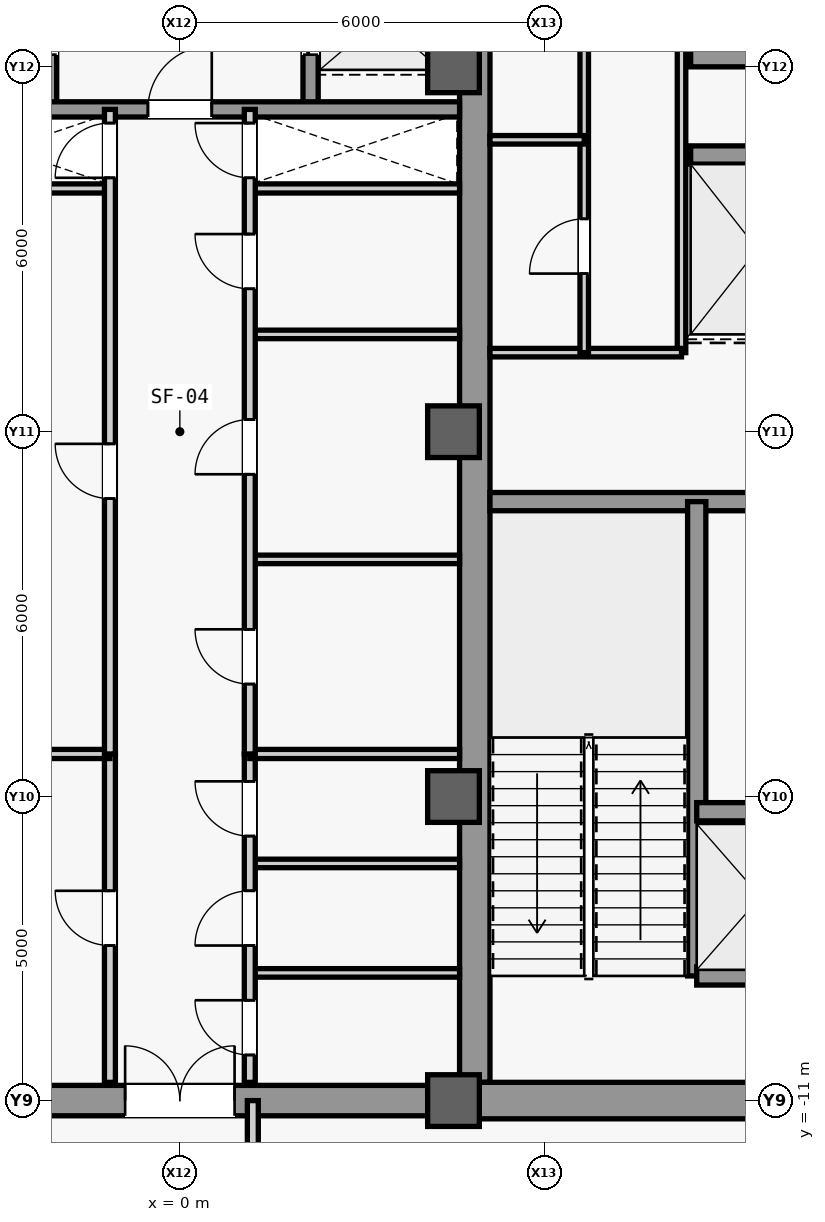
"""IFC4 building model, lengths in metres.
Left out: names, types, materials, properties, quantities, classifications, styles, units other than length and angle.
Written with IfcOpenShell. Run it as: python <this file> out.ifc"""

import sys

from ifc_helpers import new_model, si_unit, direction, frame, frame_2d, origin, origin_2d, place, context, subcontext, project, spatial, rectangle, extrude, source, transform, mapped, element, fill, save


model = new_model("IFC4")
c1 = context("Model", 3, precision=1e-05, world=origin(), true_north=direction((0.0, 1.0)))
c2 = subcontext(c1, "Body", "Model", "MODEL_VIEW")
j1 = project(units=[si_unit("LENGTHUNIT", "METRE"), si_unit("PLANEANGLEUNIT", "RADIAN")], contexts=[c1])
p1 = place(None, origin())
s1 = spatial("IfcSite", under=j1, at=p1, CompositionType="ELEMENT")
p2 = place(p1, origin())
s2 = spatial("IfcBuilding", under=s1, at=p2, CompositionType="ELEMENT")
p3 = place(p2, frame((0.0, 0.0, 263.1)))
s3 = spatial("IfcBuildingStorey", under=s2, at=p3, CompositionType="ELEMENT", Elevation=263.1)
m1 = source(origin(), c2, "Body", "SweptSolid", [
    extrude(rectangle(XDim=21.4, YDim=0.5, at=frame_2d((10.7, 0.0))), origin(), (0.0, 0.0, 1.0), 4.6),
])
p4 = place(p3, frame((4.85, -10.7, 0.0), z_axis=(0.0, 0.0, 1.0), x_axis=(0.0, 1.0, 0.0)))
e1 = element("IfcWall", 1, at=p4, inside=s3, PredefinedType="SHEAR", context=c2, shape_type="MappedRepresentation", body=[
    mapped(m1, transform((0.0, 0.0, 0.0), scale=1.0)),
])
m2 = source(origin(), c2, "Body", "SweptSolid", [
    extrude(rectangle(XDim=5.9, YDim=0.6, at=frame_2d((2.95, 0.0))), origin(), (0.0, 0.0, 1.0), 4.6),
])
p5 = place(p3, frame((4.85, -11.0, 0.0), z_axis=(0.0, 0.0, 1.0), x_axis=(1.0, 0.0, 0.0)))
e2 = element("IfcWall", 2, at=p5, inside=s3, PredefinedType="SHEAR", context=c2, shape_type="MappedRepresentation", body=[
    mapped(m2, transform((0.0, 0.0, 0.0), scale=1.0)),
])
m3 = source(origin(), c2, "Body", "SweptSolid", [
    extrude(rectangle(XDim=5.65, YDim=0.3, at=frame_2d((2.825, 0.0))), origin(), (0.0, 0.0, 1.0), 4.6),
])
p6 = place(p3, frame((5.1, -1.15, 0.0), z_axis=(0.0, 0.0, 1.0), x_axis=(1.0, 0.0, 0.0)))
e3 = element("IfcWall", 3, at=p6, inside=s3, PredefinedType="SHEAR", context=c2, shape_type="MappedRepresentation", body=[
    mapped(m3, transform((0.0, 0.0, 0.0), scale=1.0)),
])
m4 = source(origin(), c2, "Body", "SweptSolid", [
    extrude(rectangle(XDim=9.2, YDim=0.5, at=frame_2d((4.6, 0.0))), origin(), (0.0, 0.0, 1.0), 4.6),
])
p7 = place(p3, frame((-4.6, -11.0, 0.0), z_axis=(0.0, 0.0, 1.0), x_axis=(1.0, 0.0, 0.0)))
e4 = element("IfcWall", 4, at=p7, inside=s3, PredefinedType="SHEAR", context=c2, shape_type="MappedRepresentation", body=[
    mapped(m4, transform((0.0, 0.0, 0.0), scale=1.0)),
])
m5 = source(origin(), c2, "Body", "SweptSolid", [
    extrude(rectangle(XDim=1.8, YDim=2.25, at=frame_2d((0.9, 1.125))), frame((0.0, 0.26, 0.0), z_axis=(0.0, -1.0, 0.0), x_axis=(1.0, 0.0, 0.0)), (0.0, 0.0, 1.0), 0.52),
])
p8 = place(p7, frame((3.7, 0.0, 0.0)))
e5 = element("IfcOpeningElement", 5, at=p8, cuts=e4, PredefinedType="OPENING", context=c2, shape_type="MappedRepresentation", body=[
    mapped(m5, transform((0.0, 0.0, 0.0), scale=1.0)),
])
m6 = source(origin(), c2, "Body", "SweptSolid", [
    extrude(rectangle(XDim=0.85, YDim=0.85, at=origin_2d()), origin(), (0.0, 0.0, 1.0), 5.2),
])
for number, where, z_axis, x_axis in (
    (6, (4.5, -11.0, 0.0), (0.0, 0.0, 1.0), (1.0, 0.0, 0.0)),
    (7, (4.5, -6.0, 0.0), (0.0, 0.0, 1.0), (1.0, 0.0, 0.0)),
    (8, (4.5, 0.0, 0.0), (0.0, 0.0, 1.0), (1.0, 0.0, 0.0)),
    (9, (4.5, 6.0, 0.0), (0.0, 0.0, 1.0), (1.0, 0.0, 0.0)),
):
    element("IfcColumn", number, at=place(p3, frame(where, z_axis=z_axis, x_axis=x_axis)), inside=s3, PredefinedType="COLUMN", context=c2, shape_type="MappedRepresentation", body=[
        mapped(m6, transform((0.0, 0.0, 0.0), scale=1.0)),
    ])
m7 = source(origin(), c2, "Body", "SweptSolid", [
    extrude(rectangle(XDim=7.8, YDim=0.3, at=frame_2d((3.9, 0.0))), origin(), (0.0, 0.0, 1.0), 4.6),
])
p9 = place(p3, frame((8.5, -8.95, 0.0), z_axis=(0.0, 0.0, 1.0), x_axis=(0.0, 1.0, 0.0)))
e10 = element("IfcWall", 10, at=p9, inside=s3, PredefinedType="SHEAR", context=c2, shape_type="MappedRepresentation", body=[
    mapped(m7, transform((0.0, 0.0, 0.0), scale=1.0)),
])
m8 = source(origin(), c2, "Body", "SweptSolid", [
    extrude(rectangle(XDim=2.2, YDim=0.3, at=frame_2d((1.1, 0.0))), origin(), (0.0, 0.0, 1.0), 4.6),
])
for number, where, z_axis, x_axis in (
    (11, (8.5, -8.95, 0.0), (0.0, 0.0, 1.0), (1.0, 0.0, 0.0)),
    (12, (8.5, -6.25, 0.0), (0.0, 0.0, 1.0), (1.0, 0.0, 0.0)),
):
    element("IfcWall", number, at=place(p3, frame(where, z_axis=z_axis, x_axis=x_axis)), inside=s3, PredefinedType="SHEAR", context=c2, shape_type="MappedRepresentation", body=[
        mapped(m8, transform((0.0, 0.0, 0.0), scale=1.0)),
    ])
m9 = source(origin(), c2, "Body", "SweptSolid", [
    extrude(rectangle(XDim=2.3, YDim=0.3, at=frame_2d((1.15, 0.0))), origin(), (0.0, 0.0, 1.0), 4.6),
])
for number, where, z_axis, x_axis in (
    (13, (8.4, 4.55, 0.0), (0.0, 0.0, 1.0), (1.0, 0.0, 0.0)),
    (14, (8.4, 6.15, 0.0), (0.0, 0.0, 1.0), (1.0, 0.0, 0.0)),
):
    element("IfcWall", number, at=place(p3, frame(where, z_axis=z_axis, x_axis=x_axis)), inside=s3, PredefinedType="SHEAR", context=c2, shape_type="MappedRepresentation", body=[
        mapped(m9, transform((0.0, 0.0, 0.0), scale=1.0)),
    ])
m10 = source(origin(), c2, "Body", "SweptSolid", [
    extrude(rectangle(XDim=9.4, YDim=0.14, at=frame_2d((4.7, 0.0))), origin(), (0.0, 0.0, 1.0), 4.6),
])
p10 = place(p3, frame((8.25, 1.3, 0.0), z_axis=(0.0, 0.0, 1.0), x_axis=(0.0, 1.0, 0.0)))
e15 = element("IfcWall", 15, at=p10, inside=s3, PredefinedType="PARTITIONING", context=c2, shape_type="MappedRepresentation", body=[
    mapped(m10, transform((0.0, 0.0, 0.0), scale=1.0)),
])
m11 = source(origin(), c2, "Body", "SweptSolid", [
    extrude(rectangle(XDim=3.15, YDim=0.14, at=frame_2d((1.575, 0.0))), origin(), (0.0, 0.0, 1.0), 4.6),
])
p11 = place(p3, frame((5.1, 1.3, 0.0), z_axis=(0.0, 0.0, 1.0), x_axis=(1.0, 0.0, 0.0)))
e16 = element("IfcWall", 16, at=p11, inside=s3, PredefinedType="PARTITIONING", context=c2, shape_type="MappedRepresentation", body=[
    mapped(m11, transform((0.0, 0.0, 0.0), scale=1.0)),
])
m12 = source(origin(), c2, "Body", "SweptSolid", [
    extrude(rectangle(XDim=7.1, YDim=0.14, at=frame_2d((3.55, 0.0))), origin(), (0.0, 0.0, 1.0), 4.6),
])
p12 = place(p3, frame((6.65, 1.3, 0.0), z_axis=(0.0, 0.0, 1.0), x_axis=(0.0, 1.0, 0.0)))
e17 = element("IfcWall", 17, at=p12, inside=s3, PredefinedType="PARTITIONING", context=c2, shape_type="MappedRepresentation", body=[
    mapped(m12, transform((0.0, 0.0, 0.0), scale=1.0)),
])
m13 = source(origin(), c2, "Body", "SweptSolid", [
    extrude(rectangle(XDim=0.9, YDim=2.15, at=frame_2d((0.45, 1.075))), frame((0.0, 0.08, 0.0), z_axis=(0.0, -1.0, 0.0), x_axis=(1.0, 0.0, 0.0)), (0.0, 0.0, 1.0), 0.16),
])
p13 = place(p12, frame((1.3, 0.0, 0.0)))
e18 = element("IfcOpeningElement", 18, at=p13, cuts=e17, PredefinedType="OPENING", context=c2, shape_type="MappedRepresentation", body=[
    mapped(m13, transform((0.0, 0.0, 0.0), scale=1.0)),
])
m14 = source(origin(), c2, "Body", "SweptSolid", [
    extrude(rectangle(XDim=1.55, YDim=0.14, at=frame_2d((0.775, 0.0))), origin(), (0.0, 0.0, 1.0), 4.6),
])
p14 = place(p3, frame((5.1, 4.8, 0.0), z_axis=(0.0, 0.0, 1.0), x_axis=(1.0, 0.0, 0.0)))
e19 = element("IfcWall", 19, at=p14, inside=s3, PredefinedType="PARTITIONING", context=c2, shape_type="MappedRepresentation", body=[
    mapped(m14, transform((0.0, 0.0, 0.0), scale=1.0)),
])
m15 = source(origin(), c2, "Body", "SweptSolid", [
    extrude(rectangle(XDim=3.45, YDim=0.15, at=frame_2d((1.725, 0.0))), origin(), (0.0, 0.0, 1.0), 4.6),
])
for number, where, z_axis, x_axis in (
    (20, (-4.6, 4.0, 0.0), (0.0, 0.0, 1.0), (1.0, 0.0, 0.0)),
    (21, (1.15, 4.0, 0.0), (0.0, 0.0, 1.0), (1.0, 0.0, 0.0)),
):
    element("IfcWall", number, at=place(p3, frame(where, z_axis=z_axis, x_axis=x_axis)), inside=s3, PredefinedType="PARTITIONING", context=c2, shape_type="MappedRepresentation", body=[
        mapped(m15, transform((0.0, 0.0, 0.0), scale=1.0)),
    ])
m16 = source(origin(), c2, "Body", "SweptSolid", [
    extrude(rectangle(XDim=5.4, YDim=0.18, at=frame_2d((2.7, 0.0))), origin(), (0.0, 0.0, 1.0), 4.6),
])
p15 = place(p3, frame((-1.15, -10.7, 0.0), z_axis=(0.0, 0.0, 1.0), x_axis=(0.0, 1.0, 0.0)))
e22 = element("IfcWall", 22, at=p15, inside=s3, PredefinedType="PARTITIONING", context=c2, shape_type="MappedRepresentation", body=[
    mapped(m16, transform((0.0, 0.0, 0.0), scale=1.0)),
])
m17 = source(origin(), c2, "Body", "SweptSolid", [
    extrude(rectangle(XDim=0.9, YDim=2.15, at=frame_2d((0.45, 1.075))), frame((0.0, 0.1, 0.0), z_axis=(0.0, -1.0, 0.0), x_axis=(1.0, 0.0, 0.0)), (0.0, 0.0, 1.0), 0.2),
])
p16 = place(p15, frame((2.25, 0.0, 0.0)))
e23 = element("IfcOpeningElement", 23, at=p16, cuts=e22, PredefinedType="OPENING", context=c2, shape_type="MappedRepresentation", body=[
    mapped(m17, transform((0.0, 0.0, 0.0), scale=1.0)),
])
m18 = source(origin(), c2, "Body", "SweptSolid", [
    extrude(rectangle(XDim=3.45, YDim=0.14, at=frame_2d((1.725, 0.0))), origin(), (0.0, 0.0, 1.0), 4.6),
])
for number, where, z_axis, x_axis in (
    (24, (1.15, -8.9, 0.0), (0.0, 0.0, 1.0), (1.0, 0.0, 0.0)),
    (25, (1.15, -7.1, 0.0), (0.0, 0.0, 1.0), (1.0, 0.0, 0.0)),
):
    element("IfcWall", number, at=place(p3, frame(where, z_axis=z_axis, x_axis=x_axis)), inside=s3, PredefinedType="PARTITIONING", context=c2, shape_type="MappedRepresentation", body=[
        mapped(m18, transform((0.0, 0.0, 0.0), scale=1.0)),
    ])
p17 = place(p3, frame((1.15, -10.7, 0.0), z_axis=(0.0, 0.0, 1.0), x_axis=(0.0, 1.0, 0.0)))
e26 = element("IfcWall", 26, at=p17, inside=s3, PredefinedType="PARTITIONING", context=c2, shape_type="MappedRepresentation", body=[
    mapped(m16, transform((0.0, 0.0, 0.0), scale=1.0)),
])
p18 = place(p17, frame((0.45, 0.0, 0.0)))
e27 = element("IfcOpeningElement", 27, at=p18, cuts=e26, PredefinedType="OPENING", context=c2, shape_type="MappedRepresentation", body=[
    mapped(m17, transform((0.0, 0.0, 0.0), scale=1.0)),
])
p19 = place(p17, frame((2.25, 0.0, 0.0)))
e28 = element("IfcOpeningElement", 28, at=p19, cuts=e26, PredefinedType="OPENING", context=c2, shape_type="MappedRepresentation", body=[
    mapped(m17, transform((0.0, 0.0, 0.0), scale=1.0)),
])
p20 = place(p17, frame((4.05, 0.0, 0.0)))
e29 = element("IfcOpeningElement", 29, at=p20, cuts=e26, PredefinedType="OPENING", context=c2, shape_type="MappedRepresentation", body=[
    mapped(m17, transform((0.0, 0.0, 0.0), scale=1.0)),
])
for number, where, z_axis, x_axis in (
    (30, (-4.6, -5.3, 0.0), (0.0, 0.0, 1.0), (1.0, 0.0, 0.0)),
    (31, (1.15, -5.3, 0.0), (0.0, 0.0, 1.0), (1.0, 0.0, 0.0)),
):
    element("IfcWall", number, at=place(p3, frame(where, z_axis=z_axis, x_axis=x_axis)), inside=s3, PredefinedType="PARTITIONING", context=c2, shape_type="MappedRepresentation", body=[
        mapped(m15, transform((0.0, 0.0, 0.0), scale=1.0)),
    ])
m19 = source(origin(), c2, "Body", "SweptSolid", [
    extrude(rectangle(XDim=5.4, YDim=0.25, at=frame_2d((2.7, 0.0))), origin(), (0.0, 0.0, 1.0), 4.6),
])
p21 = place(p3, frame((-2.15, 5.3, 0.0), z_axis=(0.0, 0.0, 1.0), x_axis=(0.0, 1.0, 0.0)))
e32 = element("IfcWall", 32, at=p21, inside=s3, PredefinedType="SHEAR", context=c2, shape_type="MappedRepresentation", body=[
    mapped(m19, transform((0.0, 0.0, 0.0), scale=1.0)),
])
m20 = source(origin(), c2, "Body", "SweptSolid", [
    extrude(rectangle(XDim=1.2, YDim=2.3, at=frame_2d((0.6, 1.15))), frame((0.0, 0.135, 0.0), z_axis=(0.0, -1.0, 0.0), x_axis=(1.0, 0.0, 0.0)), (0.0, 0.0, 1.0), 0.27),
])
p22 = place(p21, frame((3.3, 0.0, 0.0)))
e33 = element("IfcOpeningElement", 33, at=p22, cuts=e32, PredefinedType="OPENING", context=c2, shape_type="MappedRepresentation", body=[
    mapped(m20, transform((0.0, 0.0, 0.0), scale=1.0)),
])
p23 = place(p21, frame((0.9, 0.0, 0.0)))
e34 = element("IfcOpeningElement", 34, at=p23, cuts=e32, PredefinedType="OPENING", context=c2, shape_type="MappedRepresentation", body=[
    mapped(m20, transform((0.0, 0.0, 0.0), scale=1.0)),
])
p24 = place(p3, frame((2.15, 5.3, 0.0), z_axis=(0.0, 0.0, 1.0), x_axis=(0.0, 1.0, 0.0)))
e35 = element("IfcWall", 35, at=p24, inside=s3, PredefinedType="SHEAR", context=c2, shape_type="MappedRepresentation", body=[
    mapped(m19, transform((0.0, 0.0, 0.0), scale=1.0)),
])
p25 = place(p24, frame((3.3, 0.0, 0.0)))
e36 = element("IfcOpeningElement", 36, at=p25, cuts=e35, PredefinedType="OPENING", context=c2, shape_type="MappedRepresentation", body=[
    mapped(m20, transform((0.0, 0.0, 0.0), scale=1.0)),
])
p26 = place(p24, frame((0.9, 0.0, 0.0)))
e37 = element("IfcOpeningElement", 37, at=p26, cuts=e35, PredefinedType="OPENING", context=c2, shape_type="MappedRepresentation", body=[
    mapped(m20, transform((0.0, 0.0, 0.0), scale=1.0)),
])
m21 = source(origin(), c2, "Body", "SweptSolid", [
    extrude(rectangle(XDim=9.2, YDim=0.25, at=frame_2d((4.6, 0.0))), origin(), (0.0, 0.0, 1.0), 4.6),
])
p27 = place(p3, frame((-4.6, 5.3, 0.0), z_axis=(0.0, 0.0, 1.0), x_axis=(1.0, 0.0, 0.0)))
e38 = element("IfcWall", 38, at=p27, inside=s3, PredefinedType="SHEAR", context=c2, shape_type="MappedRepresentation", body=[
    mapped(m21, transform((0.0, 0.0, 0.0), scale=1.0)),
])
m22 = source(origin(), c2, "Body", "SweptSolid", [
    extrude(rectangle(XDim=1.05, YDim=2.2, at=frame_2d((0.525, 1.1))), frame((0.0, 0.135, 0.0), z_axis=(0.0, -1.0, 0.0), x_axis=(1.0, 0.0, 0.0)), (0.0, 0.0, 1.0), 0.27),
])
p28 = place(p27, frame((4.075, 0.0, 0.0)))
e39 = element("IfcOpeningElement", 39, at=p28, cuts=e38, PredefinedType="OPENING", context=c2, shape_type="MappedRepresentation", body=[
    mapped(m22, transform((0.0, 0.0, 0.0), scale=1.0)),
])
m23 = source(origin(), c2, "Body", "SweptSolid", [
    extrude(rectangle(XDim=10.6, YDim=0.18, at=frame_2d((5.3, 0.0))), origin(), (0.0, 0.0, 1.0), 4.6),
])
p29 = place(p3, frame((-1.15, -5.3, 0.0), z_axis=(0.0, 0.0, 1.0), x_axis=(0.0, 1.0, 0.0)))
e40 = element("IfcWall", 40, at=p29, inside=s3, PredefinedType="PARTITIONING", context=c2, shape_type="MappedRepresentation", body=[
    mapped(m23, transform((0.0, 0.0, 0.0), scale=1.0)),
])
p30 = place(p29, frame((4.2, 0.0, 0.0)))
e41 = element("IfcOpeningElement", 41, at=p30, cuts=e40, PredefinedType="OPENING", context=c2, shape_type="MappedRepresentation", body=[
    mapped(m17, transform((0.0, 0.0, 0.0), scale=1.0)),
])
p31 = place(p29, frame((9.475, 0.0, 0.0)))
e42 = element("IfcOpeningElement", 42, at=p31, cuts=e40, PredefinedType="OPENING", context=c2, shape_type="MappedRepresentation", body=[
    mapped(m17, transform((0.0, 0.0, 0.0), scale=1.0)),
])
for number, where, z_axis, x_axis in (
    (43, (1.15, -2.1, 0.0), (0.0, 0.0, 1.0), (1.0, 0.0, 0.0)),
    (44, (1.15, 1.6, 0.0), (0.0, 0.0, 1.0), (1.0, 0.0, 0.0)),
):
    element("IfcWall", number, at=place(p3, frame(where, z_axis=z_axis, x_axis=x_axis)), inside=s3, PredefinedType="PARTITIONING", context=c2, shape_type="MappedRepresentation", body=[
        mapped(m18, transform((0.0, 0.0, 0.0), scale=1.0)),
    ])
p32 = place(p3, frame((1.15, -5.3, 0.0), z_axis=(0.0, 0.0, 1.0), x_axis=(0.0, 1.0, 0.0)))
e45 = element("IfcWall", 45, at=p32, inside=s3, PredefinedType="PARTITIONING", context=c2, shape_type="MappedRepresentation", body=[
    mapped(m23, transform((0.0, 0.0, 0.0), scale=1.0)),
])
p33 = place(p32, frame((1.15, 0.0, 0.0)))
e46 = element("IfcOpeningElement", 46, at=p33, cuts=e45, PredefinedType="OPENING", context=c2, shape_type="MappedRepresentation", body=[
    mapped(m17, transform((0.0, 0.0, 0.0), scale=1.0)),
])
p34 = place(p32, frame((4.6, 0.0, 0.0)))
e47 = element("IfcOpeningElement", 47, at=p34, cuts=e45, PredefinedType="OPENING", context=c2, shape_type="MappedRepresentation", body=[
    mapped(m17, transform((0.0, 0.0, 0.0), scale=1.0)),
])
p35 = place(p32, frame((7.65, 0.0, 0.0)))
e48 = element("IfcOpeningElement", 48, at=p35, cuts=e45, PredefinedType="OPENING", context=c2, shape_type="MappedRepresentation", body=[
    mapped(m17, transform((0.0, 0.0, 0.0), scale=1.0)),
])
p36 = place(p32, frame((9.475, 0.0, 0.0)))
e49 = element("IfcOpeningElement", 49, at=p36, cuts=e45, PredefinedType="OPENING", context=c2, shape_type="MappedRepresentation", body=[
    mapped(m17, transform((0.0, 0.0, 0.0), scale=1.0)),
])
m24 = source(origin(), c2, "Body", "SweptSolid", [
    extrude(rectangle(XDim=2.6, YDim=0.18, at=frame_2d((1.3, 0.0))), origin(), (0.0, 0.0, 1.0), 4.6),
])
p37 = place(p3, frame((1.2, -13.6, 0.0), z_axis=(0.0, 0.0, 1.0), x_axis=(0.0, 1.0, 0.0)))
e50 = element("IfcWall", 50, at=p37, inside=s3, PredefinedType="PARTITIONING", context=c2, shape_type="MappedRepresentation", body=[
    mapped(m24, transform((0.0, 0.0, 0.0), scale=1.0)),
])
m25 = source(origin(), c2, "Body", "SweptSolid", [
    extrude(rectangle(XDim=0.9, YDim=2.15, at=frame_2d((0.45, 1.075))), frame((0.0, 0.025, 0.0), z_axis=(0.0, -1.0, 0.0), x_axis=(1.0, 0.0, 0.0)), (0.0, 0.0, 1.0), 0.05),
])
p38 = place(p13, origin())
e51 = element("IfcDoor", 51, at=p38, inside=s3, OperationType="SINGLE_SWING_LEFT", PredefinedType="DOOR", context=c2, shape_type="MappedRepresentation", body=[
    mapped(m25, transform((0.0, 0.0, 0.0), scale=1.0)),
])
fill(e18, e51)
p39 = place(p16, origin())
e52 = element("IfcDoor", 52, at=p39, inside=s3, OperationType="SINGLE_SWING_RIGHT", PredefinedType="DOOR", context=c2, shape_type="MappedRepresentation", body=[
    mapped(m25, transform((0.0, 0.0, 0.0), scale=1.0)),
])
fill(e23, e52)
p40 = place(p18, origin())
e53 = element("IfcDoor", 53, at=p40, inside=s3, OperationType="SINGLE_SWING_RIGHT", PredefinedType="DOOR", context=c2, shape_type="MappedRepresentation", body=[
    mapped(m25, transform((0.0, 0.0, 0.0), scale=1.0)),
])
fill(e27, e53)
p41 = place(p19, origin())
e54 = element("IfcDoor", 54, at=p41, inside=s3, OperationType="SINGLE_SWING_LEFT", PredefinedType="DOOR", context=c2, shape_type="MappedRepresentation", body=[
    mapped(m25, transform((0.0, 0.0, 0.0), scale=1.0)),
])
fill(e28, e54)
p42 = place(p20, origin())
e55 = element("IfcDoor", 55, at=p42, inside=s3, OperationType="SINGLE_SWING_RIGHT", PredefinedType="DOOR", context=c2, shape_type="MappedRepresentation", body=[
    mapped(m25, transform((0.0, 0.0, 0.0), scale=1.0)),
])
fill(e29, e55)
m26 = source(origin(), c2, "Body", "SweptSolid", [
    extrude(rectangle(XDim=1.8, YDim=2.25, at=frame_2d((0.9, 1.125))), frame((0.0, 0.025, 0.0), z_axis=(0.0, -1.0, 0.0), x_axis=(1.0, 0.0, 0.0)), (0.0, 0.0, 1.0), 0.05),
])
p43 = place(p8, origin())
e56 = element("IfcDoor", 56, at=p43, inside=s3, OperationType="SINGLE_SWING_LEFT", PredefinedType="DOOR", context=c2, shape_type="MappedRepresentation", body=[
    mapped(m26, transform((0.0, 0.0, 0.0), scale=1.0)),
])
fill(e5, e56)
m27 = source(origin(), c2, "Body", "SweptSolid", [
    extrude(rectangle(XDim=1.05, YDim=2.2, at=frame_2d((0.525, 1.1))), frame((0.0, 0.025, 0.0), z_axis=(0.0, -1.0, 0.0), x_axis=(1.0, 0.0, 0.0)), (0.0, 0.0, 1.0), 0.05),
])
p44 = place(p28, origin())
e57 = element("IfcDoor", 57, at=p44, inside=s3, OperationType="SINGLE_SWING_RIGHT", PredefinedType="DOOR", context=c2, shape_type="MappedRepresentation", body=[
    mapped(m27, transform((0.0, 0.0, 0.0), scale=1.0)),
])
fill(e39, e57)
p45 = place(p30, origin())
e58 = element("IfcDoor", 58, at=p45, inside=s3, OperationType="SINGLE_SWING_RIGHT", PredefinedType="DOOR", context=c2, shape_type="MappedRepresentation", body=[
    mapped(m25, transform((0.0, 0.0, 0.0), scale=1.0)),
])
fill(e41, e58)
p46 = place(p33, origin())
e59 = element("IfcDoor", 59, at=p46, inside=s3, OperationType="SINGLE_SWING_RIGHT", PredefinedType="DOOR", context=c2, shape_type="MappedRepresentation", body=[
    mapped(m25, transform((0.0, 0.0, 0.0), scale=1.0)),
])
fill(e46, e59)
p47 = place(p34, origin())
e60 = element("IfcDoor", 60, at=p47, inside=s3, OperationType="SINGLE_SWING_LEFT", PredefinedType="DOOR", context=c2, shape_type="MappedRepresentation", body=[
    mapped(m25, transform((0.0, 0.0, 0.0), scale=1.0)),
])
fill(e47, e60)
p48 = place(p35, origin())
e61 = element("IfcDoor", 61, at=p48, inside=s3, OperationType="SINGLE_SWING_RIGHT", PredefinedType="DOOR", context=c2, shape_type="MappedRepresentation", body=[
    mapped(m25, transform((0.0, 0.0, 0.0), scale=1.0)),
])
fill(e48, e61)
p49 = place(p31, origin())
e62 = element("IfcDoor", 62, at=p49, inside=s3, OperationType="SINGLE_SWING_LEFT", PredefinedType="DOOR", context=c2, shape_type="MappedRepresentation", body=[
    mapped(m25, transform((0.0, 0.0, 0.0), scale=1.0)),
])
fill(e42, e62)
p50 = place(p36, origin())
e63 = element("IfcDoor", 63, at=p50, inside=s3, OperationType="SINGLE_SWING_RIGHT", PredefinedType="DOOR", context=c2, shape_type="MappedRepresentation", body=[
    mapped(m25, transform((0.0, 0.0, 0.0), scale=1.0)),
])
fill(e49, e63)
m28 = source(origin(), c2, "Body", "SweptSolid", [
    extrude(rectangle(XDim=1.2, YDim=2.3, at=frame_2d((0.6, 1.15))), frame((0.0, 0.025, 0.0), z_axis=(0.0, -1.0, 0.0), x_axis=(1.0, 0.0, 0.0)), (0.0, 0.0, 1.0), 0.05),
])
p51 = place(p26, origin())
e64 = element("IfcDoor", 64, at=p51, inside=s3, OperationType="SLIDING_TO_LEFT", PredefinedType="DOOR", context=c2, shape_type="MappedRepresentation", body=[
    mapped(m28, transform((0.0, 0.0, 0.0), scale=1.0)),
])
fill(e37, e64)
save(model, sys.argv[1])
